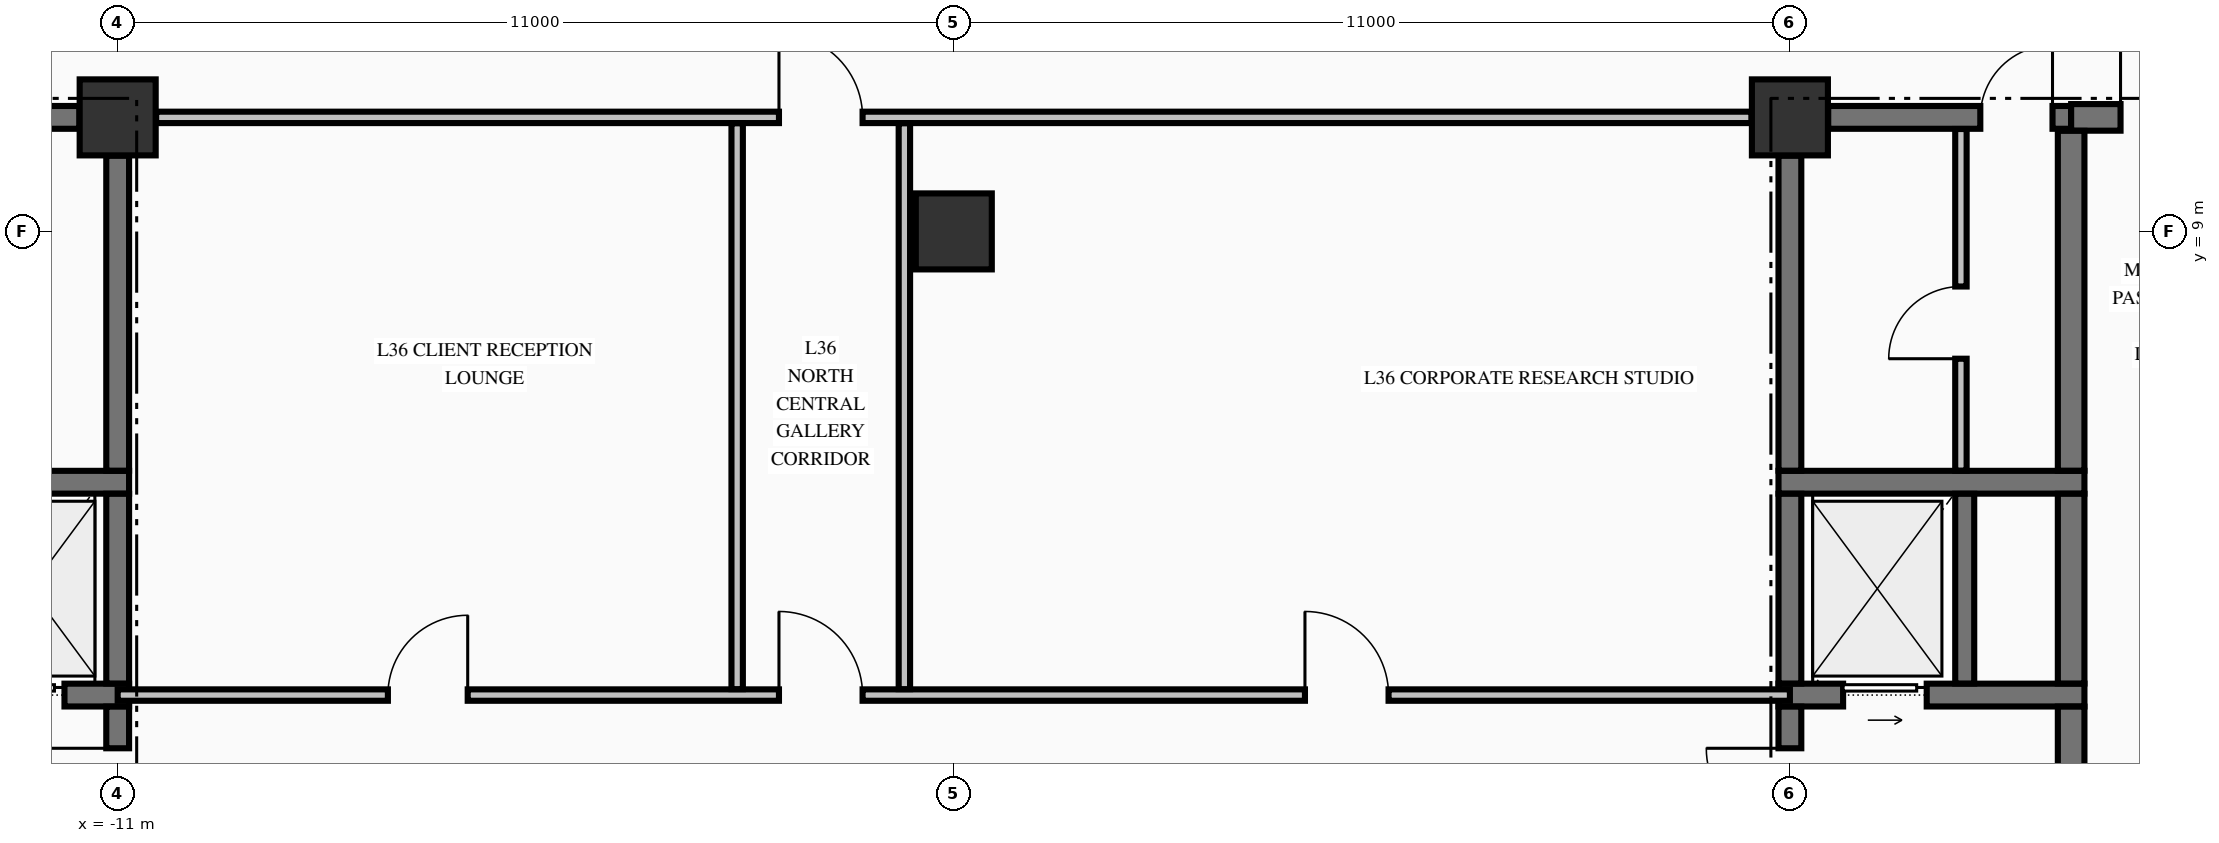
"""IFC4 building model, lengths in metres.
Left out: names, types, materials, properties, quantities, classifications, styles, units other than length and angle.
Written with IfcOpenShell. Run it as: python <this file> out.ifc"""

import sys

from ifc_helpers import new_model, si_unit, direction, frame, frame_2d, origin, origin_2d, place, context, subcontext, project, spatial, rectangle, extrude, element, fill, save


model = new_model("IFC4")
c1 = context("Model", 3, precision=1e-05, world=origin(), true_north=direction((0.0, 1.0)))
c2 = subcontext(c1, "Body", "Model", "MODEL_VIEW")
j1 = project(units=[si_unit("LENGTHUNIT", "METRE"), si_unit("PLANEANGLEUNIT", "RADIAN")], contexts=[c1])
p1 = place(None, origin())
s1 = spatial("IfcSite", under=j1, at=p1, CompositionType="ELEMENT")
p2 = place(p1, origin())
s2 = spatial("IfcBuilding", under=s1, at=p2, CompositionType="ELEMENT")
p3 = place(p2, frame((0.0, 0.0, 142.77)))
s3 = spatial("IfcBuildingStorey", under=s2, at=p3, CompositionType="ELEMENT", Elevation=142.77)
for number, where, z_axis, x_axis in (
    (1, (-11.0, 10.5, -0.325), (0.0, 0.0, 1.0), (1.0, 0.0, 0.0)),
    (2, (11.0, 10.5, -0.325), (0.0, 0.0, 1.0), (1.0, 0.0, 0.0)),
    (3, (0.0, 9.0, -0.325), (0.0, 0.0, 1.0), (1.0, 0.0, 0.0)),
):
    element("IfcColumn", number, at=place(p3, frame(where, z_axis=z_axis, x_axis=x_axis)), inside=s3, PredefinedType="COLUMN", context=c2, shape_type="SweptSolid", body=[
        extrude(rectangle(XDim=1.0, YDim=1.0, at=origin_2d()), origin(), (0.0, 0.0, 1.0), 3.645),
    ])
p4 = place(p3, frame((-14.875, 2.9, 0.0), z_axis=(0.0, 0.0, 1.0), x_axis=(1.0, 0.0, 0.0)))
e4 = element("IfcWall", 4, at=p4, inside=s3, PredefinedType="SHEAR", context=c2, shape_type="SweptSolid", body=[
    extrude(rectangle(XDim=4.025, YDim=0.3, at=frame_2d((2.012, 0.0))), origin(), (0.0, 0.0, 1.0), 3.32),
])
p5 = place(p4, frame((2.075, 0.0, 0.0)))
e5 = element("IfcOpeningElement", 5, at=p5, cuts=e4, PredefinedType="OPENING", context=c2, shape_type="SweptSolid", body=[
    extrude(rectangle(XDim=1.1, YDim=2.2, at=frame_2d((0.55, 1.1))), frame((0.0, 0.16, 0.0), z_axis=(0.0, -1.0, 0.0), x_axis=(1.0, 0.0, 0.0)), (0.0, 0.0, 1.0), 0.32),
])
p6 = place(p3, frame((10.85, 2.9, 0.0), z_axis=(0.0, 0.0, 1.0), x_axis=(1.0, 0.0, 0.0)))
e6 = element("IfcWall", 6, at=p6, inside=s3, PredefinedType="SHEAR", context=c2, shape_type="SweptSolid", body=[
    extrude(rectangle(XDim=4.025, YDim=0.3, at=frame_2d((2.012, 0.0))), origin(), (0.0, 0.0, 1.0), 3.32),
])
p7 = place(p6, frame((0.85, 0.0, 0.0)))
e7 = element("IfcOpeningElement", 7, at=p7, cuts=e6, PredefinedType="OPENING", context=c2, shape_type="SweptSolid", body=[
    extrude(rectangle(XDim=1.1, YDim=2.2, at=frame_2d((0.55, 1.1))), frame((0.0, 0.16, 0.0), z_axis=(0.0, -1.0, 0.0), x_axis=(1.0, 0.0, 0.0)), (0.0, 0.0, 1.0), 0.32),
])
for number, where, z_axis, x_axis in (
    (8, (-14.875, 5.7, 0.0), (0.0, 0.0, 1.0), (1.0, 0.0, 0.0)),
    (9, (10.85, 5.7, 0.0), (0.0, 0.0, 1.0), (1.0, 0.0, 0.0)),
):
    element("IfcWall", number, at=place(p3, frame(where, z_axis=z_axis, x_axis=x_axis)), inside=s3, PredefinedType="SHEAR", context=c2, shape_type="SweptSolid", body=[
        extrude(rectangle(XDim=4.025, YDim=0.3, at=frame_2d((2.012, 0.0))), origin(), (0.0, 0.0, 1.0), 3.32),
    ])
p8 = place(p3, frame((-14.7, 10.5, 0.0), z_axis=(0.0, 0.0, 1.0), x_axis=(1.0, 0.0, 0.0)))
e10 = element("IfcWall", 10, at=p8, inside=s3, PredefinedType="SHEAR", context=c2, shape_type="SweptSolid", body=[
    extrude(rectangle(XDim=3.196, YDim=0.3, at=frame_2d((1.598, 0.0))), origin(), (0.0, 0.0, 1.0), 3.32),
])
p9 = place(p8, frame((0.775, 0.0, 0.0)))
e11 = element("IfcOpeningElement", 11, at=p9, cuts=e10, PredefinedType="OPENING", context=c2, shape_type="SweptSolid", body=[
    extrude(rectangle(XDim=0.95, YDim=2.15, at=frame_2d((0.475, 1.075))), frame((0.0, 0.16, 0.0), z_axis=(0.0, -1.0, 0.0), x_axis=(1.0, 0.0, 0.0)), (0.0, 0.0, 1.0), 0.32),
])
p10 = place(p3, frame((11.504, 10.5, 0.0), z_axis=(0.0, 0.0, 1.0), x_axis=(1.0, 0.0, 0.0)))
e12 = element("IfcWall", 12, at=p10, inside=s3, PredefinedType="SHEAR", context=c2, shape_type="SweptSolid", body=[
    extrude(rectangle(XDim=3.196, YDim=0.3, at=frame_2d((1.598, 0.0))), origin(), (0.0, 0.0, 1.0), 3.32),
])
p11 = place(p10, frame((2.001, 0.0, 0.0)))
e13 = element("IfcOpeningElement", 13, at=p11, cuts=e12, PredefinedType="OPENING", context=c2, shape_type="SweptSolid", body=[
    extrude(rectangle(XDim=0.95, YDim=2.15, at=frame_2d((0.475, 1.075))), frame((0.0, 0.16, 0.0), z_axis=(0.0, -1.0, 0.0), x_axis=(1.0, 0.0, 0.0)), (0.0, 0.0, 1.0), 0.32),
])
p12 = place(p3, frame((14.7, 10.5, 0.0), z_axis=(0.0, 0.0, 1.0), x_axis=(1.0, 0.0, 0.0)))
e14 = element("IfcWall", 14, at=p12, inside=s3, PredefinedType="SHEAR", context=c2, shape_type="SweptSolid", body=[
    extrude(rectangle(XDim=4.796, YDim=0.35, at=frame_2d((2.398, 0.0))), origin(), (0.0, 0.0, 1.0), 3.32),
])
p13 = place(p12, frame((0.65, 0.0, 0.0)))
e15 = element("IfcOpeningElement", 15, at=p13, cuts=e14, PredefinedType="OPENING", context=c2, shape_type="SweptSolid", body=[
    extrude(rectangle(XDim=1.2, YDim=2.15, at=frame_2d((0.6, 1.075))), frame((0.0, 0.185, 0.0), z_axis=(0.0, -1.0, 0.0), x_axis=(1.0, 0.0, 0.0)), (0.0, 0.0, 1.0), 0.37),
])
p14 = place(p12, frame((3.25, 0.0, 0.0)))
e16 = element("IfcOpeningElement", 16, at=p14, cuts=e14, PredefinedType="OPENING", context=c2, shape_type="SweptSolid", body=[
    extrude(rectangle(XDim=0.9, YDim=2.15, at=frame_2d((0.45, 1.075))), frame((0.0, 0.185, 0.0), z_axis=(0.0, -1.0, 0.0), x_axis=(1.0, 0.0, 0.0)), (0.0, 0.0, 1.0), 0.37),
])
p15 = place(p3, frame((-11.0, 2.9, 0.0), z_axis=(0.0, 0.0, 1.0), x_axis=(1.0, 0.0, 0.0)))
e17 = element("IfcWall", 17, at=p15, inside=s3, PredefinedType="PARTITIONING", context=c2, shape_type="SweptSolid", body=[
    extrude(rectangle(XDim=22.0, YDim=0.15, at=frame_2d((11.0, 0.0))), origin(), (0.0, 0.0, 1.0), 3.32),
])
p16 = place(p15, frame((8.7, 0.0, 0.0)))
e18 = element("IfcOpeningElement", 18, at=p16, cuts=e17, PredefinedType="OPENING", context=c2, shape_type="SweptSolid", body=[
    extrude(rectangle(XDim=1.1, YDim=2.15, at=frame_2d((0.55, 1.075))), frame((0.0, 0.085, 0.0), z_axis=(0.0, -1.0, 0.0), x_axis=(1.0, 0.0, 0.0)), (0.0, 0.0, 1.0), 0.17),
])
p17 = place(p15, frame((3.555, 0.0, 0.0)))
e19 = element("IfcOpeningElement", 19, at=p17, cuts=e17, PredefinedType="OPENING", context=c2, shape_type="SweptSolid", body=[
    extrude(rectangle(XDim=1.05, YDim=2.15, at=frame_2d((0.525, 1.075))), frame((0.0, 0.085, 0.0), z_axis=(0.0, -1.0, 0.0), x_axis=(1.0, 0.0, 0.0)), (0.0, 0.0, 1.0), 0.17),
])
p18 = place(p15, frame((15.62, 0.0, 0.0)))
e20 = element("IfcOpeningElement", 20, at=p18, cuts=e17, PredefinedType="OPENING", context=c2, shape_type="SweptSolid", body=[
    extrude(rectangle(XDim=1.1, YDim=2.15, at=frame_2d((0.55, 1.075))), frame((0.0, 0.085, 0.0), z_axis=(0.0, -1.0, 0.0), x_axis=(1.0, 0.0, 0.0)), (0.0, 0.0, 1.0), 0.17),
])
p19 = place(p3, frame((-10.494, 10.5, 0.0), z_axis=(0.0, 0.0, 1.0), x_axis=(1.0, 0.0, 0.0)))
e21 = element("IfcWall", 21, at=p19, inside=s3, PredefinedType="PARTITIONING", context=c2, shape_type="SweptSolid", body=[
    extrude(rectangle(XDim=20.988, YDim=0.15, at=frame_2d((10.494, 0.0))), origin(), (0.0, 0.0, 1.0), 3.32),
])
p20 = place(p19, frame((8.194, 0.0, 0.0)))
e22 = element("IfcOpeningElement", 22, at=p20, cuts=e21, PredefinedType="OPENING", context=c2, shape_type="SweptSolid", body=[
    extrude(rectangle(XDim=1.1, YDim=2.15, at=frame_2d((0.55, 1.075))), frame((0.0, 0.085, 0.0), z_axis=(0.0, -1.0, 0.0), x_axis=(1.0, 0.0, 0.0)), (0.0, 0.0, 1.0), 0.17),
])
p21 = place(p3, frame((-11.0, 0.504, 0.0), z_axis=(0.0, 0.0, 1.0), x_axis=(0.0, 1.0, 0.0)))
e23 = element("IfcWall", 23, at=p21, inside=s3, PredefinedType="SHEAR", context=c2, shape_type="SweptSolid", body=[
    extrude(rectangle(XDim=2.244, YDim=0.3, at=frame_2d((1.122, 0.0))), origin(), (0.0, 0.0, 1.0), 3.32),
])
p22 = place(p21, frame((0.596, 0.0, 0.0)))
e24 = element("IfcOpeningElement", 24, at=p22, cuts=e23, PredefinedType="OPENING", context=c2, shape_type="SweptSolid", body=[
    extrude(rectangle(XDim=1.1, YDim=2.15, at=frame_2d((0.55, 1.075))), frame((0.0, 0.16, 0.0), z_axis=(0.0, -1.0, 0.0), x_axis=(1.0, 0.0, 0.0)), (0.0, 0.0, 1.0), 0.32),
])
p23 = place(p3, frame((-11.0, 3.052, 0.0), z_axis=(0.0, 0.0, 1.0), x_axis=(0.0, 1.0, 0.0)))
e25 = element("IfcWall", 25, at=p23, inside=s3, PredefinedType="SHEAR", context=c2, shape_type="SweptSolid", body=[
    extrude(rectangle(XDim=2.496, YDim=0.3, at=frame_2d((1.248, 0.0))), origin(), (0.0, 0.0, 1.0), 3.32),
])
p24 = place(p3, frame((-11.0, 5.852, 0.0), z_axis=(0.0, 0.0, 1.0), x_axis=(0.0, 1.0, 0.0)))
e26 = element("IfcWall", 26, at=p24, inside=s3, PredefinedType="SHEAR", context=c2, shape_type="SweptSolid", body=[
    extrude(rectangle(XDim=4.144, YDim=0.3, at=frame_2d((2.072, 0.0))), origin(), (0.0, 0.0, 1.0), 3.32),
])
p25 = place(p3, frame((11.0, 0.504, 0.0), z_axis=(0.0, 0.0, 1.0), x_axis=(0.0, 1.0, 0.0)))
e27 = element("IfcWall", 27, at=p25, inside=s3, PredefinedType="SHEAR", context=c2, shape_type="SweptSolid", body=[
    extrude(rectangle(XDim=2.244, YDim=0.3, at=frame_2d((1.122, 0.0))), origin(), (0.0, 0.0, 1.0), 3.32),
])
p26 = place(p25, frame((0.596, 0.0, 0.0)))
e28 = element("IfcOpeningElement", 28, at=p26, cuts=e27, PredefinedType="OPENING", context=c2, shape_type="SweptSolid", body=[
    extrude(rectangle(XDim=1.1, YDim=2.15, at=frame_2d((0.55, 1.075))), frame((0.0, 0.16, 0.0), z_axis=(0.0, -1.0, 0.0), x_axis=(1.0, 0.0, 0.0)), (0.0, 0.0, 1.0), 0.32),
])
p27 = place(p3, frame((11.0, 3.052, 0.0), z_axis=(0.0, 0.0, 1.0), x_axis=(0.0, 1.0, 0.0)))
e29 = element("IfcWall", 29, at=p27, inside=s3, PredefinedType="SHEAR", context=c2, shape_type="SweptSolid", body=[
    extrude(rectangle(XDim=2.496, YDim=0.3, at=frame_2d((1.248, 0.0))), origin(), (0.0, 0.0, 1.0), 3.32),
])
p28 = place(p3, frame((11.0, 5.852, 0.0), z_axis=(0.0, 0.0, 1.0), x_axis=(0.0, 1.0, 0.0)))
e30 = element("IfcWall", 30, at=p28, inside=s3, PredefinedType="SHEAR", context=c2, shape_type="SweptSolid", body=[
    extrude(rectangle(XDim=4.144, YDim=0.3, at=frame_2d((2.072, 0.0))), origin(), (0.0, 0.0, 1.0), 3.32),
])
p29 = place(p3, frame((13.3, 3.052, 0.0), z_axis=(0.0, 0.0, 1.0), x_axis=(0.0, 1.0, 0.0)))
e31 = element("IfcWall", 31, at=p29, inside=s3, PredefinedType="SOLIDWALL", context=c2, shape_type="SweptSolid", body=[
    extrude(rectangle(XDim=2.496, YDim=0.25, at=frame_2d((1.248, 0.0))), origin(), (0.0, 0.0, 1.0), 3.32),
])
p30 = place(p3, frame((14.7, -0.098, 0.0), z_axis=(0.0, 0.0, 1.0), x_axis=(0.0, 1.0, 0.0)))
e32 = element("IfcWall", 32, at=p30, inside=s3, PredefinedType="SHEAR", context=c2, shape_type="SweptSolid", body=[
    extrude(rectangle(XDim=2.846, YDim=0.35, at=frame_2d((1.423, 0.0))), origin(), (0.0, 0.0, 1.0), 3.32),
])
p31 = place(p3, frame((14.7, 3.052, 0.0), z_axis=(0.0, 0.0, 1.0), x_axis=(0.0, 1.0, 0.0)))
e33 = element("IfcWall", 33, at=p31, inside=s3, PredefinedType="SHEAR", context=c2, shape_type="SweptSolid", body=[
    extrude(rectangle(XDim=2.496, YDim=0.35, at=frame_2d((1.248, 0.0))), origin(), (0.0, 0.0, 1.0), 3.32),
])
p32 = place(p3, frame((14.7, 5.852, 0.0), z_axis=(0.0, 0.0, 1.0), x_axis=(0.0, 1.0, 0.0)))
e34 = element("IfcWall", 34, at=p32, inside=s3, PredefinedType="SHEAR", context=c2, shape_type="SweptSolid", body=[
    extrude(rectangle(XDim=4.471, YDim=0.35, at=frame_2d((2.235, 0.0))), origin(), (0.0, 0.0, 1.0), 3.32),
])
for number, where, z_axis, x_axis in (
    (35, (-2.85, 2.978, 0.0), (0.0, 0.0, 1.0), (0.0, 1.0, 0.0)),
    (36, (-0.65, 2.978, 0.0), (0.0, 0.0, 1.0), (0.0, 1.0, 0.0)),
):
    element("IfcWall", number, at=place(p3, frame(where, z_axis=z_axis, x_axis=x_axis)), inside=s3, PredefinedType="PARTITIONING", context=c2, shape_type="SweptSolid", body=[
        extrude(rectangle(XDim=7.444, YDim=0.15, at=frame_2d((3.722, 0.0))), origin(), (0.0, 0.0, 1.0), 3.32),
    ])
p33 = place(p3, frame((13.25, 5.853, 0.0), z_axis=(0.0, 0.0, 1.0), x_axis=(0.0, 1.0, 0.0)))
e37 = element("IfcWall", 37, at=p33, inside=s3, PredefinedType="PARTITIONING", context=c2, shape_type="SweptSolid", body=[
    extrude(rectangle(XDim=4.494, YDim=0.15, at=frame_2d((2.247, 0.0))), origin(), (0.0, 0.0, 1.0), 3.32),
])
p34 = place(p33, frame((1.472, 0.0, 0.0)))
e38 = element("IfcOpeningElement", 38, at=p34, cuts=e37, PredefinedType="OPENING", context=c2, shape_type="SweptSolid", body=[
    extrude(rectangle(XDim=0.95, YDim=2.15, at=frame_2d((0.475, 1.075))), frame((0.0, 0.085, 0.0), z_axis=(0.0, -1.0, 0.0), x_axis=(1.0, 0.0, 0.0)), (0.0, 0.0, 1.0), 0.17),
])
p35 = place(p22, origin())
e39 = element("IfcDoor", 39, at=p35, inside=s3, OperationType="SINGLE_SWING_RIGHT", PredefinedType="DOOR", context=c2, shape_type="SweptSolid", body=[
    extrude(rectangle(XDim=1.1, YDim=2.15, at=frame_2d((0.55, 1.075))), frame((0.0, 0.025, 0.0), z_axis=(0.0, -1.0, 0.0), x_axis=(1.0, 0.0, 0.0)), (0.0, 0.0, 1.0), 0.05),
])
fill(e24, e39)
p36 = place(p5, origin())
e40 = element("IfcDoor", 40, at=p36, inside=s3, OperationType="SLIDING_TO_LEFT", PredefinedType="DOOR", context=c2, shape_type="SweptSolid", body=[
    extrude(rectangle(XDim=1.1, YDim=2.2, at=frame_2d((0.55, 1.1))), frame((0.0, 0.025, 0.0), z_axis=(0.0, -1.0, 0.0), x_axis=(1.0, 0.0, 0.0)), (0.0, 0.0, 1.0), 0.05),
])
fill(e5, e40)
p37 = place(p26, origin())
e41 = element("IfcDoor", 41, at=p37, inside=s3, OperationType="SINGLE_SWING_RIGHT", PredefinedType="DOOR", context=c2, shape_type="SweptSolid", body=[
    extrude(rectangle(XDim=1.1, YDim=2.15, at=frame_2d((0.55, 1.075))), frame((0.0, 0.025, 0.0), z_axis=(0.0, -1.0, 0.0), x_axis=(1.0, 0.0, 0.0)), (0.0, 0.0, 1.0), 0.05),
])
fill(e28, e41)
p38 = place(p7, origin())
e42 = element("IfcDoor", 42, at=p38, inside=s3, OperationType="SLIDING_TO_RIGHT", PredefinedType="DOOR", context=c2, shape_type="SweptSolid", body=[
    extrude(rectangle(XDim=1.1, YDim=2.2, at=frame_2d((0.55, 1.1))), frame((0.0, 0.025, 0.0), z_axis=(0.0, -1.0, 0.0), x_axis=(1.0, 0.0, 0.0)), (0.0, 0.0, 1.0), 0.05),
])
fill(e7, e42)
p39 = place(p11, origin())
e43 = element("IfcDoor", 43, at=p39, inside=s3, OperationType="SINGLE_SWING_RIGHT", PredefinedType="DOOR", context=c2, shape_type="SweptSolid", body=[
    extrude(rectangle(XDim=0.95, YDim=2.15, at=frame_2d((0.475, 1.075))), frame((0.0, 0.025, 0.0), z_axis=(0.0, -1.0, 0.0), x_axis=(1.0, 0.0, 0.0)), (0.0, 0.0, 1.0), 0.05),
])
fill(e13, e43)
p40 = place(p34, origin())
e44 = element("IfcDoor", 44, at=p40, inside=s3, OperationType="SINGLE_SWING_LEFT", PredefinedType="DOOR", context=c2, shape_type="SweptSolid", body=[
    extrude(rectangle(XDim=0.95, YDim=2.15, at=frame_2d((0.475, 1.075))), frame((0.0, 0.025, 0.0), z_axis=(0.0, -1.0, 0.0), x_axis=(1.0, 0.0, 0.0)), (0.0, 0.0, 1.0), 0.05),
])
fill(e38, e44)
p41 = place(p13, origin())
e45 = element("IfcDoor", 45, at=p41, inside=s3, OperationType="SINGLE_SWING_LEFT", PredefinedType="DOOR", context=c2, shape_type="SweptSolid", body=[
    extrude(rectangle(XDim=1.2, YDim=2.15, at=frame_2d((0.6, 1.075))), frame((0.0, 0.025, 0.0), z_axis=(0.0, -1.0, 0.0), x_axis=(1.0, 0.0, 0.0)), (0.0, 0.0, 1.0), 0.05),
])
fill(e15, e45)
p42 = place(p20, origin())
e46 = element("IfcDoor", 46, at=p42, inside=s3, OperationType="SINGLE_SWING_LEFT", PredefinedType="DOOR", context=c2, shape_type="SweptSolid", body=[
    extrude(rectangle(XDim=1.1, YDim=2.15, at=frame_2d((0.55, 1.075))), frame((0.0, 0.025, 0.0), z_axis=(0.0, -1.0, 0.0), x_axis=(1.0, 0.0, 0.0)), (0.0, 0.0, 1.0), 0.05),
])
fill(e22, e46)
p43 = place(p16, origin())
e47 = element("IfcDoor", 47, at=p43, inside=s3, OperationType="SINGLE_SWING_LEFT", PredefinedType="DOOR", context=c2, shape_type="SweptSolid", body=[
    extrude(rectangle(XDim=1.1, YDim=2.15, at=frame_2d((0.55, 1.075))), frame((0.0, 0.025, 0.0), z_axis=(0.0, -1.0, 0.0), x_axis=(1.0, 0.0, 0.0)), (0.0, 0.0, 1.0), 0.05),
])
fill(e18, e47)
p44 = place(p17, origin())
e48 = element("IfcDoor", 48, at=p44, inside=s3, OperationType="SINGLE_SWING_RIGHT", PredefinedType="DOOR", context=c2, shape_type="SweptSolid", body=[
    extrude(rectangle(XDim=1.05, YDim=2.15, at=frame_2d((0.525, 1.075))), frame((0.0, 0.025, 0.0), z_axis=(0.0, -1.0, 0.0), x_axis=(1.0, 0.0, 0.0)), (0.0, 0.0, 1.0), 0.05),
])
fill(e19, e48)
p45 = place(p18, origin())
e49 = element("IfcDoor", 49, at=p45, inside=s3, OperationType="SINGLE_SWING_LEFT", PredefinedType="DOOR", context=c2, shape_type="SweptSolid", body=[
    extrude(rectangle(XDim=1.1, YDim=2.15, at=frame_2d((0.55, 1.075))), frame((0.0, 0.025, 0.0), z_axis=(0.0, -1.0, 0.0), x_axis=(1.0, 0.0, 0.0)), (0.0, 0.0, 1.0), 0.05),
])
fill(e20, e49)
save(model, sys.argv[1])
